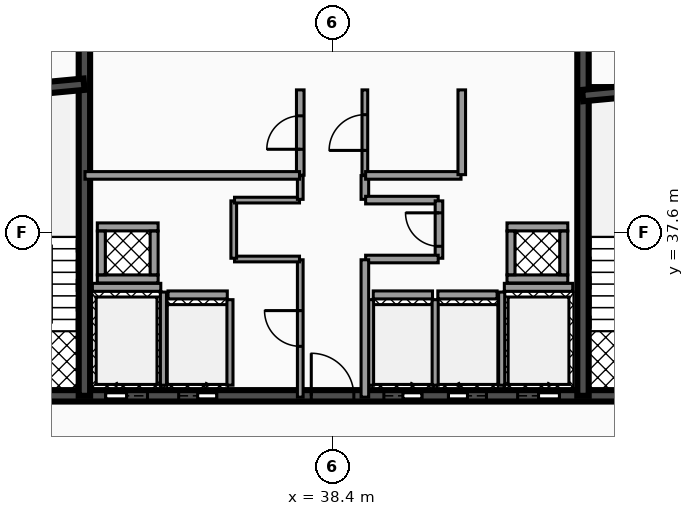
"""IFC4 building model, lengths in metres.
Left out: names, types, materials, properties, quantities, classifications, styles, units other than length and angle.
Written with IfcOpenShell. Run it as: python <this file> out.ifc"""

import sys

from ifc_helpers import new_model, si_unit, direction, frame, frame_2d, origin, place, context, subcontext, project, spatial, rectangle, extrude, element, fill, save


model = new_model("IFC4")
c1 = context("Model", 3, precision=1e-05, world=origin(), true_north=direction((0.0, 1.0)))
c2 = subcontext(c1, "Body", "Model", "MODEL_VIEW")
j1 = project(units=[si_unit("LENGTHUNIT", "METRE"), si_unit("PLANEANGLEUNIT", "RADIAN")], contexts=[c1])
p1 = place(None, origin())
s1 = spatial("IfcSite", under=j1, at=p1, CompositionType="ELEMENT")
p2 = place(p1, origin())
s2 = spatial("IfcBuilding", under=s1, at=p2, CompositionType="ELEMENT")
p3 = place(p2, frame((0.0, 0.0, 215.56)))
s3 = spatial("IfcBuildingStorey", under=s2, at=p3, CompositionType="ELEMENT", Elevation=215.56)
p4 = place(p3, frame((28.5, 33.3, 0.0), z_axis=(0.0, 0.0, 1.0), x_axis=(1.0, 0.0, 0.0)))
e1 = element("IfcWall", 1, at=p4, inside=s3, PredefinedType="SHEAR", context=c2, shape_type="SweptSolid", body=[
    extrude(rectangle(XDim=19.86, YDim=0.3, at=frame_2d((9.93, 0.0))), origin(), (0.0, 0.0, 1.0), 3.18),
])
p5 = place(p4, frame((3.93, 0.0, 0.0)))
e2 = element("IfcOpeningElement", 2, at=p5, cuts=e1, PredefinedType="OPENING", context=c2, shape_type="SweptSolid", body=[
    extrude(rectangle(XDim=1.1, YDim=2.15, at=frame_2d((0.55, 1.075))), frame((0.0, 0.16, 0.0), z_axis=(0.0, -1.0, 0.0), x_axis=(1.0, 0.0, 0.0)), (0.0, 0.0, 1.0), 0.32),
])
p6 = place(p4, frame((14.77, 0.0, 0.0)))
e3 = element("IfcOpeningElement", 3, at=p6, cuts=e1, PredefinedType="OPENING", context=c2, shape_type="SweptSolid", body=[
    extrude(rectangle(XDim=1.1, YDim=2.15, at=frame_2d((0.55, 1.075))), frame((0.0, 0.16, 0.0), z_axis=(0.0, -1.0, 0.0), x_axis=(1.0, 0.0, 0.0)), (0.0, 0.0, 1.0), 0.32),
])
p7 = place(p4, frame((11.25, 0.0, 0.0)))
e4 = element("IfcOpeningElement", 4, at=p7, cuts=e1, PredefinedType="OPENING", context=c2, shape_type="SweptSolid", body=[
    extrude(rectangle(XDim=1.0, YDim=2.1, at=frame_2d((0.5, 1.05))), frame((0.0, 0.16, 0.0), z_axis=(0.0, -1.0, 0.0), x_axis=(1.0, 0.0, 0.0)), (0.0, 0.0, 1.0), 0.32),
])
p8 = place(p4, frame((12.95, 0.0, 0.0)))
e5 = element("IfcOpeningElement", 5, at=p8, cuts=e1, PredefinedType="OPENING", context=c2, shape_type="SweptSolid", body=[
    extrude(rectangle(XDim=1.0, YDim=2.1, at=frame_2d((0.5, 1.05))), frame((0.0, 0.16, 0.0), z_axis=(0.0, -1.0, 0.0), x_axis=(1.0, 0.0, 0.0)), (0.0, 0.0, 1.0), 0.32),
])
p9 = place(p4, frame((5.85, 0.0, 0.0)))
e6 = element("IfcOpeningElement", 6, at=p9, cuts=e1, PredefinedType="OPENING", context=c2, shape_type="SweptSolid", body=[
    extrude(rectangle(XDim=1.0, YDim=2.1, at=frame_2d((0.5, 1.05))), frame((0.0, 0.16, 0.0), z_axis=(0.0, -1.0, 0.0), x_axis=(1.0, 0.0, 0.0)), (0.0, 0.0, 1.0), 0.32),
])
p10 = place(p4, frame((1.21, 0.0, 0.0)))
e7 = element("IfcOpeningElement", 7, at=p10, cuts=e1, PredefinedType="OPENING", context=c2, shape_type="SweptSolid", body=[
    extrude(rectangle(XDim=1.1, YDim=2.2, at=frame_2d((0.55, 1.1))), frame((0.0, 0.16, 0.0), z_axis=(0.0, -1.0, 0.0), x_axis=(1.0, 0.0, 0.0)), (0.0, 0.0, 1.0), 0.32),
])
p11 = place(p4, frame((9.34, 0.0, 0.0)))
e8 = element("IfcOpeningElement", 8, at=p11, cuts=e1, PredefinedType="OPENING", context=c2, shape_type="SweptSolid", body=[
    extrude(rectangle(XDim=1.12, YDim=2.05, at=frame_2d((0.56, 1.025))), frame((0.0, 0.16, 0.0), z_axis=(0.0, -1.0, 0.0), x_axis=(1.0, 0.0, 0.0)), (0.0, 0.0, 1.0), 0.32),
])
p12 = place(p4, frame((17.55, 0.0, 0.0)))
e9 = element("IfcOpeningElement", 9, at=p12, cuts=e1, PredefinedType="OPENING", context=c2, shape_type="SweptSolid", body=[
    extrude(rectangle(XDim=1.1, YDim=2.2, at=frame_2d((0.55, 1.1))), frame((0.0, 0.16, 0.0), z_axis=(0.0, -1.0, 0.0), x_axis=(1.0, 0.0, 0.0)), (0.0, 0.0, 1.0), 0.32),
])
for number, where, z_axis, x_axis in (
    (10, (31.87, 33.3, 0.0), (0.0, 0.0, 1.0), (0.0, 1.0, 0.0)),
    (11, (44.99, 33.3, 0.0), (0.0, 0.0, 1.0), (0.0, 1.0, 0.0)),
):
    element("IfcWall", number, at=place(p3, frame(where, z_axis=z_axis, x_axis=x_axis)), inside=s3, PredefinedType="SHEAR", context=c2, shape_type="SweptSolid", body=[
        extrude(rectangle(XDim=10.1, YDim=0.3, at=frame_2d((5.05, 0.0))), origin(), (0.0, 0.0, 1.0), 3.18),
    ])
p13 = place(p3, frame((28.64, 41.2, 0.0), z_axis=(0.0, 0.0, 1.0), x_axis=(0.995687118776, 0.092774789157, 0.0)))
e12 = element("IfcWall", 12, at=p13, inside=s3, PredefinedType="SHEAR", context=c2, shape_type="SweptSolid", body=[
    extrude(rectangle(XDim=3.234, YDim=0.3, at=frame_2d((1.617, 0.0))), origin(), (0.0, 0.0, 1.0), 3.18),
])
p14 = place(p3, frame((44.98, 41.2, 0.0), z_axis=(0.0, 0.0, 1.0), x_axis=(0.995686468965, 0.09278176286, 0.0)))
e13 = element("IfcWall", 13, at=p14, inside=s3, PredefinedType="SHEAR", context=c2, shape_type="SweptSolid", body=[
    extrude(rectangle(XDim=3.234, YDim=0.3, at=frame_2d((1.617, 0.0))), origin(), (0.0, 0.0, 1.0), 3.18),
])
p15 = place(p3, frame((32.08, 36.155, 0.0), z_axis=(0.0, 0.0, 1.0), x_axis=(1.0, 0.0, 0.0)))
e14 = element("IfcWall", 14, at=p15, inside=s3, PredefinedType="SOLIDWALL", context=c2, shape_type="SweptSolid", body=[
    extrude(rectangle(XDim=1.8, YDim=0.21, at=frame_2d((0.9, 0.0))), origin(), (0.0, 0.0, 1.0), 3.18),
])
p16 = place(p3, frame((33.95, 33.58, 0.0), z_axis=(0.0, 0.0, 1.0), x_axis=(0.0, 1.0, 0.0)))
e15 = element("IfcWall", 15, at=p16, inside=s3, PredefinedType="SOLIDWALL", context=c2, shape_type="SweptSolid", body=[
    extrude(rectangle(XDim=2.45, YDim=0.16, at=frame_2d((1.225, 0.0))), origin(), (0.0, 0.0, 1.0), 3.18),
])
p17 = place(p3, frame((42.92, 36.155, 0.0), z_axis=(0.0, 0.0, 1.0), x_axis=(1.0, 0.0, 0.0)))
e16 = element("IfcWall", 16, at=p17, inside=s3, PredefinedType="SOLIDWALL", context=c2, shape_type="SweptSolid", body=[
    extrude(rectangle(XDim=1.8, YDim=0.21, at=frame_2d((0.9, 0.0))), origin(), (0.0, 0.0, 1.0), 3.18),
])
p18 = place(p3, frame((42.85, 33.58, 0.0), z_axis=(0.0, 0.0, 1.0), x_axis=(0.0, 1.0, 0.0)))
e17 = element("IfcWall", 17, at=p18, inside=s3, PredefinedType="SOLIDWALL", context=c2, shape_type="SweptSolid", body=[
    extrude(rectangle(XDim=2.45, YDim=0.16, at=frame_2d((1.225, 0.0))), origin(), (0.0, 0.0, 1.0), 3.18),
])
p19 = place(p3, frame((39.47, 35.955, 0.0), z_axis=(0.0, 0.0, 1.0), x_axis=(1.0, 0.0, 0.0)))
e18 = element("IfcWall", 18, at=p19, inside=s3, PredefinedType="SOLIDWALL", context=c2, shape_type="SweptSolid", body=[
    extrude(rectangle(XDim=1.56, YDim=0.21, at=frame_2d((0.78, 0.0))), origin(), (0.0, 0.0, 1.0), 3.18),
])
for number, where, z_axis, x_axis in (
    (19, (39.4, 33.58, 0.0), (0.0, 0.0, 1.0), (0.0, 1.0, 0.0)),
    (20, (41.1, 33.58, 0.0), (0.0, 0.0, 1.0), (0.0, 1.0, 0.0)),
):
    element("IfcWall", number, at=place(p3, frame(where, z_axis=z_axis, x_axis=x_axis)), inside=s3, PredefinedType="SOLIDWALL", context=c2, shape_type="SweptSolid", body=[
        extrude(rectangle(XDim=2.25, YDim=0.16, at=frame_2d((1.125, 0.0))), origin(), (0.0, 0.0, 1.0), 3.18),
    ])
p20 = place(p3, frame((41.17, 35.955, 0.0), z_axis=(0.0, 0.0, 1.0), x_axis=(1.0, 0.0, 0.0)))
e21 = element("IfcWall", 21, at=p20, inside=s3, PredefinedType="SOLIDWALL", context=c2, shape_type="SweptSolid", body=[
    extrude(rectangle(XDim=1.56, YDim=0.21, at=frame_2d((0.78, 0.0))), origin(), (0.0, 0.0, 1.0), 3.18),
])
p21 = place(p3, frame((34.07, 35.955, 0.0), z_axis=(0.0, 0.0, 1.0), x_axis=(1.0, 0.0, 0.0)))
e22 = element("IfcWall", 22, at=p21, inside=s3, PredefinedType="SOLIDWALL", context=c2, shape_type="SweptSolid", body=[
    extrude(rectangle(XDim=1.56, YDim=0.21, at=frame_2d((0.78, 0.0))), origin(), (0.0, 0.0, 1.0), 3.18),
])
p22 = place(p3, frame((35.7, 33.58, 0.0), z_axis=(0.0, 0.0, 1.0), x_axis=(0.0, 1.0, 0.0)))
e23 = element("IfcWall", 23, at=p22, inside=s3, PredefinedType="SOLIDWALL", context=c2, shape_type="SweptSolid", body=[
    extrude(rectangle(XDim=2.25, YDim=0.16, at=frame_2d((1.125, 0.0))), origin(), (0.0, 0.0, 1.0), 3.18),
])
for number, where, z_axis, x_axis in (
    (24, (32.21, 36.375, 0.0), (0.0, 0.0, 1.0), (1.0, 0.0, 0.0)),
    (25, (32.21, 37.745, 0.0), (0.0, 0.0, 1.0), (1.0, 0.0, 0.0)),
):
    element("IfcWall", number, at=place(p3, frame(where, z_axis=z_axis, x_axis=x_axis)), inside=s3, PredefinedType="SOLIDWALL", context=c2, shape_type="SweptSolid", body=[
        extrude(rectangle(XDim=1.6, YDim=0.21, at=frame_2d((0.8, 0.0))), origin(), (0.0, 0.0, 1.0), 3.18),
    ])
for number, where, z_axis, x_axis in (
    (26, (32.315, 36.485, 0.0), (0.0, 0.0, 1.0), (0.0, 1.0, 0.0)),
    (27, (33.705, 36.485, 0.0), (0.0, 0.0, 1.0), (0.0, 1.0, 0.0)),
):
    element("IfcWall", number, at=place(p3, frame(where, z_axis=z_axis, x_axis=x_axis)), inside=s3, PredefinedType="SOLIDWALL", context=c2, shape_type="SweptSolid", body=[
        extrude(rectangle(XDim=1.15, YDim=0.21, at=frame_2d((0.575, 0.0))), origin(), (0.0, 0.0, 1.0), 3.18),
    ])
for number, where, z_axis, x_axis in (
    (28, (42.99, 36.375, 0.0), (0.0, 0.0, 1.0), (1.0, 0.0, 0.0)),
    (29, (42.99, 37.745, 0.0), (0.0, 0.0, 1.0), (1.0, 0.0, 0.0)),
):
    element("IfcWall", number, at=place(p3, frame(where, z_axis=z_axis, x_axis=x_axis)), inside=s3, PredefinedType="SOLIDWALL", context=c2, shape_type="SweptSolid", body=[
        extrude(rectangle(XDim=1.6, YDim=0.21, at=frame_2d((0.8, 0.0))), origin(), (0.0, 0.0, 1.0), 3.18),
    ])
for number, where, z_axis, x_axis in (
    (30, (43.095, 36.485, 0.0), (0.0, 0.0, 1.0), (0.0, 1.0, 0.0)),
    (31, (44.485, 36.485, 0.0), (0.0, 0.0, 1.0), (0.0, 1.0, 0.0)),
):
    element("IfcWall", number, at=place(p3, frame(where, z_axis=z_axis, x_axis=x_axis)), inside=s3, PredefinedType="SOLIDWALL", context=c2, shape_type="SweptSolid", body=[
        extrude(rectangle(XDim=1.15, YDim=0.21, at=frame_2d((0.575, 0.0))), origin(), (0.0, 0.0, 1.0), 3.18),
    ])
p23 = place(p3, frame((37.55, 33.265, 0.0), z_axis=(0.0, 0.0, 1.0), x_axis=(0.0, 1.0, 0.0)))
e32 = element("IfcWall", 32, at=p23, inside=s3, PredefinedType="PARTITIONING", context=c2, shape_type="SweptSolid", body=[
    extrude(rectangle(XDim=3.615, YDim=0.15, at=frame_2d((1.808, 0.0))), origin(), (0.0, 0.0, 1.0), 2.235),
])
p24 = place(p23, frame((1.337, 0.0, 0.0)))
e33 = element("IfcOpeningElement", 33, at=p24, cuts=e32, PredefinedType="OPENING", context=c2, shape_type="SweptSolid", body=[
    extrude(rectangle(XDim=0.94, YDim=2.05, at=frame_2d((0.47, 1.025))), frame((0.0, 0.085, 0.0), z_axis=(0.0, -1.0, 0.0), x_axis=(1.0, 0.0, 0.0)), (0.0, 0.0, 1.0), 0.17),
])
p25 = place(p3, frame((35.82, 36.9, 0.0), z_axis=(0.0, 0.0, 1.0), x_axis=(1.0, 0.0, 0.0)))
e34 = element("IfcWall", 34, at=p25, inside=s3, PredefinedType="PARTITIONING", context=c2, shape_type="SweptSolid", body=[
    extrude(rectangle(XDim=1.71, YDim=0.15, at=frame_2d((0.855, 0.0))), origin(), (0.0, 0.0, 1.0), 2.235),
])
p26 = place(p3, frame((35.8, 36.92, 0.0), z_axis=(0.0, 0.0, 1.0), x_axis=(0.0, 1.0, 0.0)))
e35 = element("IfcWall", 35, at=p26, inside=s3, PredefinedType="PARTITIONING", context=c2, shape_type="SweptSolid", body=[
    extrude(rectangle(XDim=1.51, YDim=0.15, at=frame_2d((0.755, 0.0))), origin(), (0.0, 0.0, 1.0), 2.235),
])
p27 = place(p3, frame((35.82, 38.45, 0.0), z_axis=(0.0, 0.0, 1.0), x_axis=(1.0, 0.0, 0.0)))
e36 = element("IfcWall", 36, at=p27, inside=s3, PredefinedType="PARTITIONING", context=c2, shape_type="SweptSolid", body=[
    extrude(rectangle(XDim=1.71, YDim=0.15, at=frame_2d((0.855, 0.0))), origin(), (0.0, 0.0, 1.0), 2.235),
])
p28 = place(p3, frame((37.55, 38.47, 0.0), z_axis=(0.0, 0.0, 1.0), x_axis=(0.0, 1.0, 0.0)))
e37 = element("IfcWall", 37, at=p28, inside=s3, PredefinedType="PARTITIONING", context=c2, shape_type="SweptSolid", body=[
    extrude(rectangle(XDim=0.625, YDim=0.15, at=frame_2d((0.312, 0.0))), origin(), (0.0, 0.0, 1.0), 2.235),
])
p29 = place(p3, frame((37.55, 39.105, 0.0), z_axis=(0.0, 0.0, 1.0), x_axis=(0.0, 1.0, 0.0)))
e38 = element("IfcWall", 38, at=p29, inside=s3, PredefinedType="PARTITIONING", context=c2, shape_type="SweptSolid", body=[
    extrude(rectangle(XDim=2.245, YDim=0.2, at=frame_2d((1.123, 0.0))), origin(), (0.0, 0.0, 1.0), 2.235),
])
p30 = place(p29, frame((0.683, 0.0, 0.0)))
e39 = element("IfcOpeningElement", 39, at=p30, cuts=e38, PredefinedType="OPENING", context=c2, shape_type="SweptSolid", body=[
    extrude(rectangle(XDim=0.88, YDim=2.05, at=frame_2d((0.44, 1.025))), frame((0.0, 0.11, 0.0), z_axis=(0.0, -1.0, 0.0), x_axis=(1.0, 0.0, 0.0)), (0.0, 0.0, 1.0), 0.22),
])
p31 = place(p3, frame((39.25, 38.47, 0.0), z_axis=(0.0, 0.0, 1.0), x_axis=(0.0, 1.0, 0.0)))
e40 = element("IfcWall", 40, at=p31, inside=s3, PredefinedType="PARTITIONING", context=c2, shape_type="SweptSolid", body=[
    extrude(rectangle(XDim=0.625, YDim=0.2, at=frame_2d((0.312, 0.0))), origin(), (0.0, 0.0, 1.0), 2.235),
])
p32 = place(p3, frame((39.27, 38.45, 0.0), z_axis=(0.0, 0.0, 1.0), x_axis=(1.0, 0.0, 0.0)))
e41 = element("IfcWall", 41, at=p32, inside=s3, PredefinedType="PARTITIONING", context=c2, shape_type="SweptSolid", body=[
    extrude(rectangle(XDim=1.91, YDim=0.2, at=frame_2d((0.955, 0.0))), origin(), (0.0, 0.0, 1.0), 2.235),
])
p33 = place(p3, frame((41.2, 36.92, 0.0), z_axis=(0.0, 0.0, 1.0), x_axis=(0.0, 1.0, 0.0)))
e42 = element("IfcWall", 42, at=p33, inside=s3, PredefinedType="PARTITIONING", context=c2, shape_type="SweptSolid", body=[
    extrude(rectangle(XDim=1.51, YDim=0.2, at=frame_2d((0.755, 0.0))), origin(), (0.0, 0.0, 1.0), 2.235),
])
p34 = place(p33, frame((0.315, 0.0, 0.0)))
e43 = element("IfcOpeningElement", 43, at=p34, cuts=e42, PredefinedType="OPENING", context=c2, shape_type="SweptSolid", body=[
    extrude(rectangle(XDim=0.88, YDim=2.05, at=frame_2d((0.44, 1.025))), frame((0.0, 0.11, 0.0), z_axis=(0.0, -1.0, 0.0), x_axis=(1.0, 0.0, 0.0)), (0.0, 0.0, 1.0), 0.22),
])
p35 = place(p3, frame((39.27, 36.9, 0.0), z_axis=(0.0, 0.0, 1.0), x_axis=(1.0, 0.0, 0.0)))
e44 = element("IfcWall", 44, at=p35, inside=s3, PredefinedType="PARTITIONING", context=c2, shape_type="SweptSolid", body=[
    extrude(rectangle(XDim=1.91, YDim=0.2, at=frame_2d((0.955, 0.0))), origin(), (0.0, 0.0, 1.0), 2.235),
])
p36 = place(p3, frame((39.25, 33.265, 0.0), z_axis=(0.0, 0.0, 1.0), x_axis=(0.0, 1.0, 0.0)))
e45 = element("IfcWall", 45, at=p36, inside=s3, PredefinedType="PARTITIONING", context=c2, shape_type="SweptSolid", body=[
    extrude(rectangle(XDim=3.615, YDim=0.2, at=frame_2d((1.808, 0.0))), origin(), (0.0, 0.0, 1.0), 2.235),
])
p37 = place(p3, frame((39.25, 39.105, 0.0), z_axis=(0.0, 0.0, 1.0), x_axis=(0.0, 1.0, 0.0)))
e46 = element("IfcWall", 46, at=p37, inside=s3, PredefinedType="PARTITIONING", context=c2, shape_type="SweptSolid", body=[
    extrude(rectangle(XDim=2.245, YDim=0.15, at=frame_2d((1.123, 0.0))), origin(), (0.0, 0.0, 1.0), 2.235),
])
p38 = place(p37, frame((0.653, 0.0, 0.0)))
e47 = element("IfcOpeningElement", 47, at=p38, cuts=e46, PredefinedType="OPENING", context=c2, shape_type="SweptSolid", body=[
    extrude(rectangle(XDim=0.94, YDim=2.05, at=frame_2d((0.47, 1.025))), frame((0.0, 0.085, 0.0), z_axis=(0.0, -1.0, 0.0), x_axis=(1.0, 0.0, 0.0)), (0.0, 0.0, 1.0), 0.17),
])
p39 = place(p3, frame((31.885, 39.1, 0.0), z_axis=(0.0, 0.0, 1.0), x_axis=(1.0, 0.0, 0.0)))
e48 = element("IfcWall", 48, at=p39, inside=s3, PredefinedType="PARTITIONING", context=c2, shape_type="SweptSolid", body=[
    extrude(rectangle(XDim=5.645, YDim=0.2, at=frame_2d((2.823, 0.0))), origin(), (0.0, 0.0, 1.0), 2.235),
])
p40 = place(p3, frame((39.27, 39.1, 0.0), z_axis=(0.0, 0.0, 1.0), x_axis=(1.0, 0.0, 0.0)))
e49 = element("IfcWall", 49, at=p40, inside=s3, PredefinedType="PARTITIONING", context=c2, shape_type="SweptSolid", body=[
    extrude(rectangle(XDim=2.51, YDim=0.2, at=frame_2d((1.255, 0.0))), origin(), (0.0, 0.0, 1.0), 2.235),
])
p41 = place(p3, frame((41.8, 39.12, 0.0), z_axis=(0.0, 0.0, 1.0), x_axis=(0.0, 1.0, 0.0)))
e50 = element("IfcWall", 50, at=p41, inside=s3, PredefinedType="PARTITIONING", context=c2, shape_type="SweptSolid", body=[
    extrude(rectangle(XDim=2.23, YDim=0.2, at=frame_2d((1.115, 0.0))), origin(), (0.0, 0.0, 1.0), 2.235),
])
p42 = place(p5, origin())
e51 = element("IfcDoor", 51, at=p42, inside=s3, OperationType="SLIDING_TO_LEFT", PredefinedType="DOOR", context=c2, shape_type="SweptSolid", body=[
    extrude(rectangle(XDim=1.1, YDim=2.15, at=frame_2d((0.55, 1.075))), frame((0.0, 0.025, 0.0), z_axis=(0.0, -1.0, 0.0), x_axis=(1.0, 0.0, 0.0)), (0.0, 0.0, 1.0), 0.05),
])
fill(e2, e51)
p43 = place(p6, origin())
e52 = element("IfcDoor", 52, at=p43, inside=s3, OperationType="SLIDING_TO_RIGHT", PredefinedType="DOOR", context=c2, shape_type="SweptSolid", body=[
    extrude(rectangle(XDim=1.1, YDim=2.15, at=frame_2d((0.55, 1.075))), frame((0.0, 0.025, 0.0), z_axis=(0.0, -1.0, 0.0), x_axis=(1.0, 0.0, 0.0)), (0.0, 0.0, 1.0), 0.05),
])
fill(e3, e52)
p44 = place(p7, origin())
e53 = element("IfcDoor", 53, at=p44, inside=s3, OperationType="SLIDING_TO_RIGHT", PredefinedType="DOOR", context=c2, shape_type="SweptSolid", body=[
    extrude(rectangle(XDim=1.0, YDim=2.1, at=frame_2d((0.5, 1.05))), frame((0.0, 0.025, 0.0), z_axis=(0.0, -1.0, 0.0), x_axis=(1.0, 0.0, 0.0)), (0.0, 0.0, 1.0), 0.05),
])
fill(e4, e53)
p45 = place(p8, origin())
e54 = element("IfcDoor", 54, at=p45, inside=s3, OperationType="SLIDING_TO_LEFT", PredefinedType="DOOR", context=c2, shape_type="SweptSolid", body=[
    extrude(rectangle(XDim=1.0, YDim=2.1, at=frame_2d((0.5, 1.05))), frame((0.0, 0.025, 0.0), z_axis=(0.0, -1.0, 0.0), x_axis=(1.0, 0.0, 0.0)), (0.0, 0.0, 1.0), 0.05),
])
fill(e5, e54)
p46 = place(p9, origin())
e55 = element("IfcDoor", 55, at=p46, inside=s3, OperationType="SLIDING_TO_RIGHT", PredefinedType="DOOR", context=c2, shape_type="SweptSolid", body=[
    extrude(rectangle(XDim=1.0, YDim=2.1, at=frame_2d((0.5, 1.05))), frame((0.0, 0.025, 0.0), z_axis=(0.0, -1.0, 0.0), x_axis=(1.0, 0.0, 0.0)), (0.0, 0.0, 1.0), 0.05),
])
fill(e6, e55)
p47 = place(p11, origin())
e56 = element("IfcDoor", 56, at=p47, inside=s3, OperationType="SINGLE_SWING_LEFT", PredefinedType="DOOR", context=c2, shape_type="SweptSolid", body=[
    extrude(rectangle(XDim=1.12, YDim=2.05, at=frame_2d((0.56, 1.025))), frame((0.0, 0.025, 0.0), z_axis=(0.0, -1.0, 0.0), x_axis=(1.0, 0.0, 0.0)), (0.0, 0.0, 1.0), 0.05),
])
fill(e8, e56)
p48 = place(p24, origin())
e57 = element("IfcDoor", 57, at=p48, inside=s3, OperationType="SINGLE_SWING_RIGHT", PredefinedType="DOOR", context=c2, shape_type="SweptSolid", body=[
    extrude(rectangle(XDim=0.94, YDim=2.05, at=frame_2d((0.47, 1.025))), frame((0.0, 0.025, 0.0), z_axis=(0.0, -1.0, 0.0), x_axis=(1.0, 0.0, 0.0)), (0.0, 0.0, 1.0), 0.05),
])
fill(e33, e57)
p49 = place(p30, origin())
e58 = element("IfcDoor", 58, at=p49, inside=s3, OperationType="SINGLE_SWING_LEFT", PredefinedType="DOOR", context=c2, shape_type="SweptSolid", body=[
    extrude(rectangle(XDim=0.88, YDim=2.05, at=frame_2d((0.44, 1.025))), frame((0.0, 0.025, 0.0), z_axis=(0.0, -1.0, 0.0), x_axis=(1.0, 0.0, 0.0)), (0.0, 0.0, 1.0), 0.05),
])
fill(e39, e58)
p50 = place(p34, origin())
e59 = element("IfcDoor", 59, at=p50, inside=s3, OperationType="SINGLE_SWING_RIGHT", PredefinedType="DOOR", context=c2, shape_type="SweptSolid", body=[
    extrude(rectangle(XDim=0.88, YDim=2.05, at=frame_2d((0.44, 1.025))), frame((0.0, 0.025, 0.0), z_axis=(0.0, -1.0, 0.0), x_axis=(1.0, 0.0, 0.0)), (0.0, 0.0, 1.0), 0.05),
])
fill(e43, e59)
p51 = place(p38, origin())
e60 = element("IfcDoor", 60, at=p51, inside=s3, OperationType="SINGLE_SWING_LEFT", PredefinedType="DOOR", context=c2, shape_type="SweptSolid", body=[
    extrude(rectangle(XDim=0.94, YDim=2.05, at=frame_2d((0.47, 1.025))), frame((0.0, 0.025, 0.0), z_axis=(0.0, -1.0, 0.0), x_axis=(1.0, 0.0, 0.0)), (0.0, 0.0, 1.0), 0.05),
])
fill(e47, e60)
save(model, sys.argv[1])
